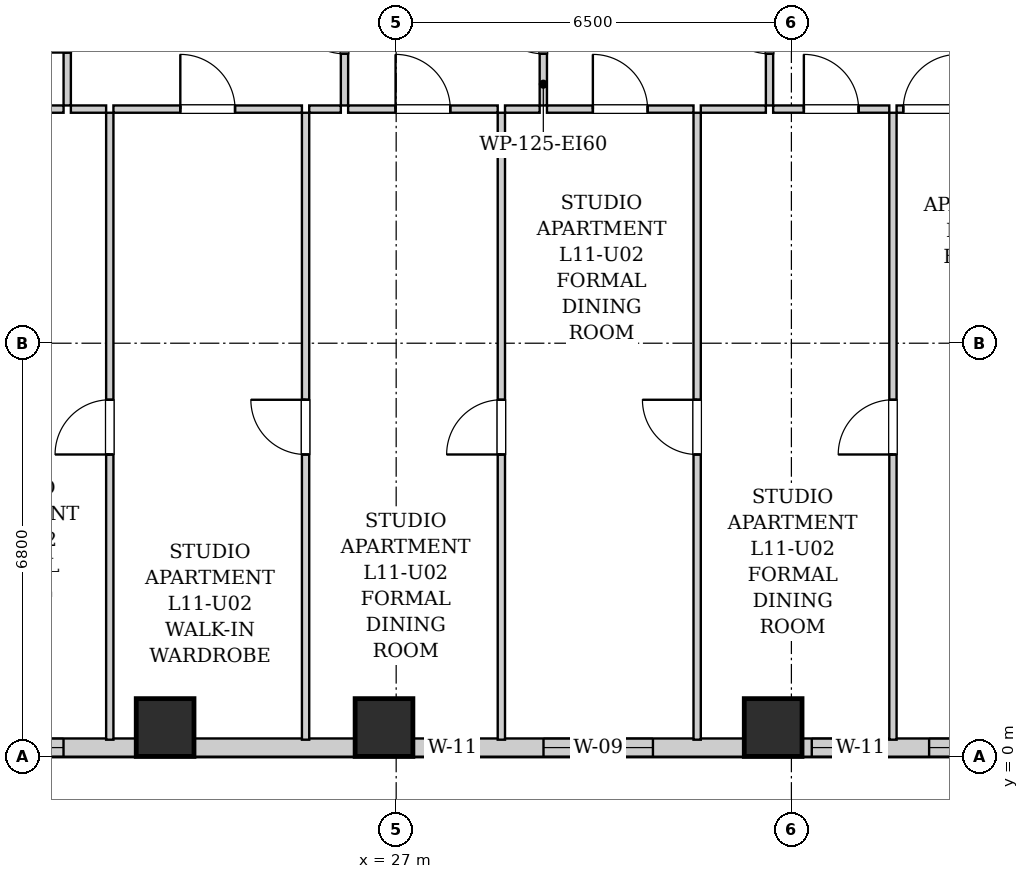
"""IFC4 building model, lengths in metres.
Left out: names, types, materials, properties, quantities, classifications, styles, units other than length and angle.
Written with IfcOpenShell. Run it as: python <this file> out.ifc"""

import sys

from ifc_helpers import new_model, si_unit, direction, frame, frame_2d, origin, origin_2d, place, context, subcontext, project, spatial, rectangle, extrude, element, fill, save


model = new_model("IFC4")
c1 = context("Model", 3, precision=1e-05, world=origin(), true_north=direction((0.0, 1.0)))
c2 = subcontext(c1, "Body", "Model", "MODEL_VIEW")
j1 = project(units=[si_unit("LENGTHUNIT", "METRE"), si_unit("PLANEANGLEUNIT", "RADIAN")], contexts=[c1])
p1 = place(None, origin())
s1 = spatial("IfcSite", under=j1, at=p1, CompositionType="ELEMENT")
p2 = place(p1, origin())
s2 = spatial("IfcBuilding", under=s1, at=p2, CompositionType="ELEMENT")
p3 = place(p2, frame((0.0, 0.0, 45.0)))
s3 = spatial("IfcBuildingStorey", under=s2, at=p3, CompositionType="ELEMENT", Elevation=45.0)
for number, where, z_axis, x_axis in (
    (1, (23.2, 0.48, 0.0), (0.0, 0.0, 1.0), (1.0, 0.0, 0.0)),
    (2, (26.8, 0.48, 0.0), (0.0, 0.0, 1.0), (1.0, 0.0, 0.0)),
    (3, (33.2, 0.48, 0.0), (0.0, 0.0, 1.0), (1.0, 0.0, 0.0)),
):
    element("IfcColumn", number, at=place(p3, frame(where, z_axis=z_axis, x_axis=x_axis)), inside=s3, PredefinedType="COLUMN", context=c2, shape_type="SweptSolid", body=[
        extrude(rectangle(XDim=0.95, YDim=0.95, at=origin_2d()), origin(), (0.0, 0.0, 1.0), 3.2),
    ])
p4 = place(p3, frame((44.0, 0.15, 0.0), z_axis=(0.0, 0.0, 1.0), x_axis=(-1.0, 0.0, 0.0)))
e4 = element("IfcWall", 4, at=p4, inside=s3, PredefinedType="SOLIDWALL", context=c2, shape_type="SweptSolid", body=[
    extrude(rectangle(XDim=25.7, YDim=0.3, at=frame_2d((12.85, 0.0))), origin(), (0.0, 0.0, 1.0), 1.975),
])
p5 = place(p4, frame((22.471, 0.0, 0.55)))
e5 = element("IfcOpeningElement", 5, at=p5, cuts=e4, PredefinedType="OPENING", context=c2, shape_type="SweptSolid", body=[
    extrude(rectangle(XDim=1.8, YDim=1.2, at=frame_2d((0.9, 0.6))), frame((0.0, 0.16, 0.0), z_axis=(0.0, -1.0, 0.0), x_axis=(1.0, 0.0, 0.0)), (0.0, 0.0, 1.0), 0.32),
])
p6 = place(p4, frame((15.65, 0.0, 0.55)))
e6 = element("IfcOpeningElement", 6, at=p6, cuts=e4, PredefinedType="OPENING", context=c2, shape_type="SweptSolid", body=[
    extrude(rectangle(XDim=0.85, YDim=1.2, at=frame_2d((0.425, 0.6))), frame((0.0, 0.16, 0.0), z_axis=(0.0, -1.0, 0.0), x_axis=(1.0, 0.0, 0.0)), (0.0, 0.0, 1.0), 0.32),
])
p7 = place(p4, frame((12.777, 0.0, 0.55)))
e7 = element("IfcOpeningElement", 7, at=p7, cuts=e4, PredefinedType="OPENING", context=c2, shape_type="SweptSolid", body=[
    extrude(rectangle(XDim=1.8, YDim=1.2, at=frame_2d((0.9, 0.6))), frame((0.0, 0.16, 0.0), z_axis=(0.0, -1.0, 0.0), x_axis=(1.0, 0.0, 0.0)), (0.0, 0.0, 1.0), 0.32),
])
p8 = place(p4, frame((9.315, 0.0, 0.55)))
e8 = element("IfcOpeningElement", 8, at=p8, cuts=e4, PredefinedType="OPENING", context=c2, shape_type="SweptSolid", body=[
    extrude(rectangle(XDim=0.85, YDim=1.2, at=frame_2d((0.425, 0.6))), frame((0.0, 0.16, 0.0), z_axis=(0.0, -1.0, 0.0), x_axis=(1.0, 0.0, 0.0)), (0.0, 0.0, 1.0), 0.32),
])
p9 = place(p4, frame((6.435, 0.0, 0.55)))
e9 = element("IfcOpeningElement", 9, at=p9, cuts=e4, PredefinedType="OPENING", context=c2, shape_type="SweptSolid", body=[
    extrude(rectangle(XDim=1.8, YDim=1.2, at=frame_2d((0.9, 0.6))), frame((0.0, 0.16, 0.0), z_axis=(0.0, -1.0, 0.0), x_axis=(1.0, 0.0, 0.0)), (0.0, 0.0, 1.0), 0.32),
])
p10 = place(p4, frame((2.106, 0.0, 0.55)))
e10 = element("IfcOpeningElement", 10, at=p10, cuts=e4, PredefinedType="OPENING", context=c2, shape_type="SweptSolid", body=[
    extrude(rectangle(XDim=1.8, YDim=1.2, at=frame_2d((0.9, 0.6))), frame((0.0, 0.16, 0.0), z_axis=(0.0, -1.0, 0.0), x_axis=(1.0, 0.0, 0.0)), (0.0, 0.0, 1.0), 0.32),
])
p11 = place(p3, frame((21.59, 10.71, 0.0), z_axis=(0.0, 0.0, 1.0), x_axis=(0.0, 1.0, 0.0)))
e11 = element("IfcWall", 11, at=p11, inside=s3, PredefinedType="PARTITIONING", context=c2, shape_type="SweptSolid", body=[
    extrude(rectangle(XDim=2.6, YDim=0.12, at=frame_2d((1.3, 0.0))), origin(), (0.0, 0.0, 1.0), 2.94),
])
p12 = place(p11, frame((0.87, 0.0, 0.0)))
e12 = element("IfcOpeningElement", 12, at=p12, cuts=e11, PredefinedType="OPENING", context=c2, shape_type="SweptSolid", body=[
    extrude(rectangle(XDim=0.86, YDim=2.05, at=frame_2d((0.43, 1.025))), frame((0.0, 0.07, 0.0), z_axis=(0.0, -1.0, 0.0), x_axis=(1.0, 0.0, 0.0)), (0.0, 0.0, 1.0), 0.14),
])
p13 = place(p3, frame((19.13, 10.65, 0.0), z_axis=(0.0, 0.0, 1.0), x_axis=(1.0, 0.0, 0.0)))
e13 = element("IfcWall", 13, at=p13, inside=s3, PredefinedType="PARTITIONING", context=c2, shape_type="SweptSolid", body=[
    extrude(rectangle(XDim=2.4, YDim=0.12, at=frame_2d((1.2, 0.0))), origin(), (0.0, 0.0, 1.0), 2.94),
])
p14 = place(p3, frame((26.15, 10.71, 0.0), z_axis=(0.0, 0.0, 1.0), x_axis=(0.0, 1.0, 0.0)))
e14 = element("IfcWall", 14, at=p14, inside=s3, PredefinedType="PARTITIONING", context=c2, shape_type="SweptSolid", body=[
    extrude(rectangle(XDim=2.6, YDim=0.12, at=frame_2d((1.3, 0.0))), origin(), (0.0, 0.0, 1.0), 2.94),
])
p15 = place(p14, frame((0.85, 0.0, 0.0)))
e15 = element("IfcOpeningElement", 15, at=p15, cuts=e14, PredefinedType="OPENING", context=c2, shape_type="SweptSolid", body=[
    extrude(rectangle(XDim=0.9, YDim=2.05, at=frame_2d((0.45, 1.025))), frame((0.0, 0.07, 0.0), z_axis=(0.0, -1.0, 0.0), x_axis=(1.0, 0.0, 0.0)), (0.0, 0.0, 1.0), 0.14),
])
p16 = place(p3, frame((21.65, 10.65, 0.0), z_axis=(0.0, 0.0, 1.0), x_axis=(1.0, 0.0, 0.0)))
e16 = element("IfcWall", 16, at=p16, inside=s3, PredefinedType="PARTITIONING", context=c2, shape_type="SweptSolid", body=[
    extrude(rectangle(XDim=0.58, YDim=0.12, at=frame_2d((0.29, 0.0))), origin(), (0.0, 0.0, 1.0), 2.94),
])
p17 = place(p3, frame((22.35, 10.65, 0.0), z_axis=(0.0, 0.0, 1.0), x_axis=(1.0, 0.0, 0.0)))
e17 = element("IfcWall", 17, at=p17, inside=s3, PredefinedType="PARTITIONING", context=c2, shape_type="SweptSolid", body=[
    extrude(rectangle(XDim=3.1, YDim=0.12, at=frame_2d((1.55, 0.0))), origin(), (0.0, 0.0, 1.0), 2.94),
])
p18 = place(p17, frame((1.1, 0.0, 0.0)))
e18 = element("IfcOpeningElement", 18, at=p18, cuts=e17, PredefinedType="OPENING", context=c2, shape_type="SweptSolid", body=[
    extrude(rectangle(XDim=0.9, YDim=2.05, at=frame_2d((0.45, 1.025))), frame((0.0, 0.07, 0.0), z_axis=(0.0, -1.0, 0.0), x_axis=(1.0, 0.0, 0.0)), (0.0, 0.0, 1.0), 0.14),
])
p19 = place(p3, frame((25.57, 10.65, 0.0), z_axis=(0.0, 0.0, 1.0), x_axis=(1.0, 0.0, 0.0)))
e19 = element("IfcWall", 19, at=p19, inside=s3, PredefinedType="PARTITIONING", context=c2, shape_type="SweptSolid", body=[
    extrude(rectangle(XDim=0.52, YDim=0.12, at=frame_2d((0.26, 0.0))), origin(), (0.0, 0.0, 1.0), 2.94),
])
p20 = place(p3, frame((29.42, 10.71, 0.0), z_axis=(0.0, 0.0, 1.0), x_axis=(0.0, 1.0, 0.0)))
e20 = element("IfcWall", 20, at=p20, inside=s3, PredefinedType="PARTITIONING", context=c2, shape_type="SweptSolid", body=[
    extrude(rectangle(XDim=2.6, YDim=0.12, at=frame_2d((1.3, 0.0))), origin(), (0.0, 0.0, 1.0), 2.94),
])
p21 = place(p20, frame((0.85, 0.0, 0.0)))
e21 = element("IfcOpeningElement", 21, at=p21, cuts=e20, PredefinedType="OPENING", context=c2, shape_type="SweptSolid", body=[
    extrude(rectangle(XDim=0.9, YDim=2.05, at=frame_2d((0.45, 1.025))), frame((0.0, 0.07, 0.0), z_axis=(0.0, -1.0, 0.0), x_axis=(1.0, 0.0, 0.0)), (0.0, 0.0, 1.0), 0.14),
])
p22 = place(p3, frame((26.21, 10.65, 0.0), z_axis=(0.0, 0.0, 1.0), x_axis=(1.0, 0.0, 0.0)))
e22 = element("IfcWall", 22, at=p22, inside=s3, PredefinedType="PARTITIONING", context=c2, shape_type="SweptSolid", body=[
    extrude(rectangle(XDim=2.46, YDim=0.12, at=frame_2d((1.23, 0.0))), origin(), (0.0, 0.0, 1.0), 2.94),
])
p23 = place(p22, frame((0.78, 0.0, 0.0)))
e23 = element("IfcOpeningElement", 23, at=p23, cuts=e22, PredefinedType="OPENING", context=c2, shape_type="SweptSolid", body=[
    extrude(rectangle(XDim=0.9, YDim=2.05, at=frame_2d((0.45, 1.025))), frame((0.0, 0.07, 0.0), z_axis=(0.0, -1.0, 0.0), x_axis=(1.0, 0.0, 0.0)), (0.0, 0.0, 1.0), 0.14),
])
p24 = place(p3, frame((28.79, 10.65, 0.0), z_axis=(0.0, 0.0, 1.0), x_axis=(1.0, 0.0, 0.0)))
e24 = element("IfcWall", 24, at=p24, inside=s3, PredefinedType="PARTITIONING", context=c2, shape_type="SweptSolid", body=[
    extrude(rectangle(XDim=0.57, YDim=0.12, at=frame_2d((0.285, 0.0))), origin(), (0.0, 0.0, 1.0), 2.94),
])
p25 = place(p3, frame((33.14, 10.71, 0.0), z_axis=(0.0, 0.0, 1.0), x_axis=(0.0, 1.0, 0.0)))
e25 = element("IfcWall", 25, at=p25, inside=s3, PredefinedType="PARTITIONING", context=c2, shape_type="SweptSolid", body=[
    extrude(rectangle(XDim=2.6, YDim=0.12, at=frame_2d((1.3, 0.0))), origin(), (0.0, 0.0, 1.0), 2.155),
])
p26 = place(p25, frame((0.85, 0.0, 0.0)))
e26 = element("IfcOpeningElement", 26, at=p26, cuts=e25, PredefinedType="OPENING", context=c2, shape_type="SweptSolid", body=[
    extrude(rectangle(XDim=0.9, YDim=2.05, at=frame_2d((0.45, 1.025))), frame((0.0, 0.07, 0.0), z_axis=(0.0, -1.0, 0.0), x_axis=(1.0, 0.0, 0.0)), (0.0, 0.0, 1.0), 0.14),
])
p27 = place(p3, frame((29.48, 10.65, 0.0), z_axis=(0.0, 0.0, 1.0), x_axis=(1.0, 0.0, 0.0)))
e27 = element("IfcWall", 27, at=p27, inside=s3, PredefinedType="PARTITIONING", context=c2, shape_type="SweptSolid", body=[
    extrude(rectangle(XDim=2.41, YDim=0.12, at=frame_2d((1.205, 0.0))), origin(), (0.0, 0.0, 1.0), 2.94),
])
p28 = place(p27, frame((0.755, 0.0, 0.0)))
e28 = element("IfcOpeningElement", 28, at=p28, cuts=e27, PredefinedType="OPENING", context=c2, shape_type="SweptSolid", body=[
    extrude(rectangle(XDim=0.9, YDim=2.05, at=frame_2d((0.45, 1.025))), frame((0.0, 0.07, 0.0), z_axis=(0.0, -1.0, 0.0), x_axis=(1.0, 0.0, 0.0)), (0.0, 0.0, 1.0), 0.14),
])
p29 = place(p3, frame((32.01, 10.65, 0.0), z_axis=(0.0, 0.0, 1.0), x_axis=(1.0, 0.0, 0.0)))
e29 = element("IfcWall", 29, at=p29, inside=s3, PredefinedType="PARTITIONING", context=c2, shape_type="SweptSolid", body=[
    extrude(rectangle(XDim=1.07, YDim=0.12, at=frame_2d((0.535, 0.0))), origin(), (0.0, 0.0, 1.0), 2.94),
])
p30 = place(p3, frame((33.2, 10.65, 0.0), z_axis=(0.0, 0.0, 1.0), x_axis=(1.0, 0.0, 0.0)))
e30 = element("IfcWall", 30, at=p30, inside=s3, PredefinedType="PARTITIONING", context=c2, shape_type="SweptSolid", body=[
    extrude(rectangle(XDim=1.91, YDim=0.12, at=frame_2d((0.955, 0.0))), origin(), (0.0, 0.0, 1.0), 2.94),
])
p31 = place(p30, frame((0.505, 0.0, 0.0)))
e31 = element("IfcOpeningElement", 31, at=p31, cuts=e30, PredefinedType="OPENING", context=c2, shape_type="SweptSolid", body=[
    extrude(rectangle(XDim=0.9, YDim=2.05, at=frame_2d((0.45, 1.025))), frame((0.0, 0.07, 0.0), z_axis=(0.0, -1.0, 0.0), x_axis=(1.0, 0.0, 0.0)), (0.0, 0.0, 1.0), 0.14),
])
p32 = place(p3, frame((35.23, 10.65, 0.0), z_axis=(0.0, 0.0, 1.0), x_axis=(1.0, 0.0, 0.0)))
e32 = element("IfcWall", 32, at=p32, inside=s3, PredefinedType="PARTITIONING", context=c2, shape_type="SweptSolid", body=[
    extrude(rectangle(XDim=1.12, YDim=0.12, at=frame_2d((0.56, 0.0))), origin(), (0.0, 0.0, 1.0), 2.94),
])
p33 = place(p32, frame((0.11, 0.0, 0.0)))
e33 = element("IfcOpeningElement", 33, at=p33, cuts=e32, PredefinedType="OPENING", context=c2, shape_type="SweptSolid", body=[
    extrude(rectangle(XDim=0.9, YDim=2.05, at=frame_2d((0.45, 1.025))), frame((0.0, 0.07, 0.0), z_axis=(0.0, -1.0, 0.0), x_axis=(1.0, 0.0, 0.0)), (0.0, 0.0, 1.0), 0.14),
])
p34 = place(p3, frame((22.29, 0.28, 0.0), z_axis=(0.0, 0.0, 1.0), x_axis=(0.0, 1.0, 0.0)))
e34 = element("IfcWall", 34, at=p34, inside=s3, PredefinedType="PARTITIONING", context=c2, shape_type="SweptSolid", body=[
    extrude(rectangle(XDim=10.31, YDim=0.12, at=frame_2d((5.155, 0.0))), origin(), (0.0, 0.0, 1.0), 2.94),
])
p35 = place(p34, frame((4.69, 0.0, 0.0)))
e35 = element("IfcOpeningElement", 35, at=p35, cuts=e34, PredefinedType="OPENING", context=c2, shape_type="SweptSolid", body=[
    extrude(rectangle(XDim=0.9, YDim=2.05, at=frame_2d((0.45, 1.025))), frame((0.0, 0.07, 0.0), z_axis=(0.0, -1.0, 0.0), x_axis=(1.0, 0.0, 0.0)), (0.0, 0.0, 1.0), 0.14),
])
p36 = place(p3, frame((25.51, 0.28, 0.0), z_axis=(0.0, 0.0, 1.0), x_axis=(0.0, 1.0, 0.0)))
e36 = element("IfcWall", 36, at=p36, inside=s3, PredefinedType="PARTITIONING", context=c2, shape_type="SweptSolid", body=[
    extrude(rectangle(XDim=10.31, YDim=0.12, at=frame_2d((5.155, 0.0))), origin(), (0.0, 0.0, 1.0), 2.94),
])
p37 = place(p36, frame((4.69, 0.0, 0.0)))
e37 = element("IfcOpeningElement", 37, at=p37, cuts=e36, PredefinedType="OPENING", context=c2, shape_type="SweptSolid", body=[
    extrude(rectangle(XDim=0.9, YDim=2.05, at=frame_2d((0.45, 1.025))), frame((0.0, 0.07, 0.0), z_axis=(0.0, -1.0, 0.0), x_axis=(1.0, 0.0, 0.0)), (0.0, 0.0, 1.0), 0.14),
])
p38 = place(p3, frame((28.73, 0.28, 0.0), z_axis=(0.0, 0.0, 1.0), x_axis=(0.0, 1.0, 0.0)))
e38 = element("IfcWall", 38, at=p38, inside=s3, PredefinedType="PARTITIONING", context=c2, shape_type="SweptSolid", body=[
    extrude(rectangle(XDim=10.31, YDim=0.12, at=frame_2d((5.155, 0.0))), origin(), (0.0, 0.0, 1.0), 2.94),
])
p39 = place(p38, frame((4.69, 0.0, 0.0)))
e39 = element("IfcOpeningElement", 39, at=p39, cuts=e38, PredefinedType="OPENING", context=c2, shape_type="SweptSolid", body=[
    extrude(rectangle(XDim=0.9, YDim=2.05, at=frame_2d((0.45, 1.025))), frame((0.0, 0.07, 0.0), z_axis=(0.0, -1.0, 0.0), x_axis=(1.0, 0.0, 0.0)), (0.0, 0.0, 1.0), 0.14),
])
p40 = place(p3, frame((31.95, 0.28, 0.0), z_axis=(0.0, 0.0, 1.0), x_axis=(0.0, 1.0, 0.0)))
e40 = element("IfcWall", 40, at=p40, inside=s3, PredefinedType="PARTITIONING", context=c2, shape_type="SweptSolid", body=[
    extrude(rectangle(XDim=10.31, YDim=0.12, at=frame_2d((5.155, 0.0))), origin(), (0.0, 0.0, 1.0), 2.94),
])
p41 = place(p40, frame((4.69, 0.0, 0.0)))
e41 = element("IfcOpeningElement", 41, at=p41, cuts=e40, PredefinedType="OPENING", context=c2, shape_type="SweptSolid", body=[
    extrude(rectangle(XDim=0.9, YDim=2.05, at=frame_2d((0.45, 1.025))), frame((0.0, 0.07, 0.0), z_axis=(0.0, -1.0, 0.0), x_axis=(1.0, 0.0, 0.0)), (0.0, 0.0, 1.0), 0.14),
])
p42 = place(p3, frame((35.17, 0.28, 0.0), z_axis=(0.0, 0.0, 1.0), x_axis=(0.0, 1.0, 0.0)))
e42 = element("IfcWall", 42, at=p42, inside=s3, PredefinedType="PARTITIONING", context=c2, shape_type="SweptSolid", body=[
    extrude(rectangle(XDim=10.31, YDim=0.12, at=frame_2d((5.155, 0.0))), origin(), (0.0, 0.0, 1.0), 2.94),
])
p43 = place(p42, frame((4.69, 0.0, 0.0)))
e43 = element("IfcOpeningElement", 43, at=p43, cuts=e42, PredefinedType="OPENING", context=c2, shape_type="SweptSolid", body=[
    extrude(rectangle(XDim=0.9, YDim=2.05, at=frame_2d((0.45, 1.025))), frame((0.0, 0.07, 0.0), z_axis=(0.0, -1.0, 0.0), x_axis=(1.0, 0.0, 0.0)), (0.0, 0.0, 1.0), 0.14),
])
p44 = place(p12, origin())
e44 = element("IfcDoor", 44, at=p44, inside=s3, OperationType="SINGLE_SWING_LEFT", PredefinedType="DOOR", context=c2, shape_type="SweptSolid", body=[
    extrude(rectangle(XDim=0.86, YDim=2.05, at=frame_2d((0.43, 1.025))), frame((0.0, 0.025, 0.0), z_axis=(0.0, -1.0, 0.0), x_axis=(1.0, 0.0, 0.0)), (0.0, 0.0, 1.0), 0.05),
])
fill(e12, e44)
p45 = place(p15, origin())
e45 = element("IfcDoor", 45, at=p45, inside=s3, OperationType="SINGLE_SWING_RIGHT", PredefinedType="DOOR", context=c2, shape_type="SweptSolid", body=[
    extrude(rectangle(XDim=0.9, YDim=2.05, at=frame_2d((0.45, 1.025))), frame((0.0, 0.025, 0.0), z_axis=(0.0, -1.0, 0.0), x_axis=(1.0, 0.0, 0.0)), (0.0, 0.0, 1.0), 0.05),
])
fill(e15, e45)
p46 = place(p18, origin())
e46 = element("IfcDoor", 46, at=p46, inside=s3, OperationType="SINGLE_SWING_LEFT", PredefinedType="DOOR", context=c2, shape_type="SweptSolid", body=[
    extrude(rectangle(XDim=0.9, YDim=2.05, at=frame_2d((0.45, 1.025))), frame((0.0, 0.025, 0.0), z_axis=(0.0, -1.0, 0.0), x_axis=(1.0, 0.0, 0.0)), (0.0, 0.0, 1.0), 0.05),
])
fill(e18, e46)
p47 = place(p21, origin())
e47 = element("IfcDoor", 47, at=p47, inside=s3, OperationType="SINGLE_SWING_RIGHT", PredefinedType="DOOR", context=c2, shape_type="SweptSolid", body=[
    extrude(rectangle(XDim=0.9, YDim=2.05, at=frame_2d((0.45, 1.025))), frame((0.0, 0.025, 0.0), z_axis=(0.0, -1.0, 0.0), x_axis=(1.0, 0.0, 0.0)), (0.0, 0.0, 1.0), 0.05),
])
fill(e21, e47)
p48 = place(p23, origin())
e48 = element("IfcDoor", 48, at=p48, inside=s3, OperationType="SINGLE_SWING_LEFT", PredefinedType="DOOR", context=c2, shape_type="SweptSolid", body=[
    extrude(rectangle(XDim=0.9, YDim=2.05, at=frame_2d((0.45, 1.025))), frame((0.0, 0.025, 0.0), z_axis=(0.0, -1.0, 0.0), x_axis=(1.0, 0.0, 0.0)), (0.0, 0.0, 1.0), 0.05),
])
fill(e23, e48)
p49 = place(p26, origin())
e49 = element("IfcDoor", 49, at=p49, inside=s3, OperationType="SINGLE_SWING_RIGHT", PredefinedType="DOOR", context=c2, shape_type="SweptSolid", body=[
    extrude(rectangle(XDim=0.9, YDim=2.05, at=frame_2d((0.45, 1.025))), frame((0.0, 0.025, 0.0), z_axis=(0.0, -1.0, 0.0), x_axis=(1.0, 0.0, 0.0)), (0.0, 0.0, 1.0), 0.05),
])
fill(e26, e49)
p50 = place(p28, origin())
e50 = element("IfcDoor", 50, at=p50, inside=s3, OperationType="SINGLE_SWING_LEFT", PredefinedType="DOOR", context=c2, shape_type="SweptSolid", body=[
    extrude(rectangle(XDim=0.9, YDim=2.05, at=frame_2d((0.45, 1.025))), frame((0.0, 0.025, 0.0), z_axis=(0.0, -1.0, 0.0), x_axis=(1.0, 0.0, 0.0)), (0.0, 0.0, 1.0), 0.05),
])
fill(e28, e50)
p51 = place(p31, origin())
e51 = element("IfcDoor", 51, at=p51, inside=s3, OperationType="SINGLE_SWING_LEFT", PredefinedType="DOOR", context=c2, shape_type="SweptSolid", body=[
    extrude(rectangle(XDim=0.9, YDim=2.05, at=frame_2d((0.45, 1.025))), frame((0.0, 0.025, 0.0), z_axis=(0.0, -1.0, 0.0), x_axis=(1.0, 0.0, 0.0)), (0.0, 0.0, 1.0), 0.05),
])
fill(e31, e51)
p52 = place(p33, origin())
e52 = element("IfcDoor", 52, at=p52, inside=s3, OperationType="SINGLE_SWING_RIGHT", PredefinedType="DOOR", context=c2, shape_type="SweptSolid", body=[
    extrude(rectangle(XDim=0.9, YDim=2.05, at=frame_2d((0.45, 1.025))), frame((0.0, 0.025, 0.0), z_axis=(0.0, -1.0, 0.0), x_axis=(1.0, 0.0, 0.0)), (0.0, 0.0, 1.0), 0.05),
])
fill(e33, e52)
p53 = place(p35, origin())
e53 = element("IfcDoor", 53, at=p53, inside=s3, OperationType="SINGLE_SWING_LEFT", PredefinedType="DOOR", context=c2, shape_type="SweptSolid", body=[
    extrude(rectangle(XDim=0.9, YDim=2.05, at=frame_2d((0.45, 1.025))), frame((0.0, 0.025, 0.0), z_axis=(0.0, -1.0, 0.0), x_axis=(1.0, 0.0, 0.0)), (0.0, 0.0, 1.0), 0.05),
])
fill(e35, e53)
p54 = place(p37, origin())
e54 = element("IfcDoor", 54, at=p54, inside=s3, OperationType="SINGLE_SWING_RIGHT", PredefinedType="DOOR", context=c2, shape_type="SweptSolid", body=[
    extrude(rectangle(XDim=0.9, YDim=2.05, at=frame_2d((0.45, 1.025))), frame((0.0, 0.025, 0.0), z_axis=(0.0, -1.0, 0.0), x_axis=(1.0, 0.0, 0.0)), (0.0, 0.0, 1.0), 0.05),
])
fill(e37, e54)
p55 = place(p39, origin())
e55 = element("IfcDoor", 55, at=p55, inside=s3, OperationType="SINGLE_SWING_LEFT", PredefinedType="DOOR", context=c2, shape_type="SweptSolid", body=[
    extrude(rectangle(XDim=0.9, YDim=2.05, at=frame_2d((0.45, 1.025))), frame((0.0, 0.025, 0.0), z_axis=(0.0, -1.0, 0.0), x_axis=(1.0, 0.0, 0.0)), (0.0, 0.0, 1.0), 0.05),
])
fill(e39, e55)
p56 = place(p41, origin())
e56 = element("IfcDoor", 56, at=p56, inside=s3, OperationType="SINGLE_SWING_RIGHT", PredefinedType="DOOR", context=c2, shape_type="SweptSolid", body=[
    extrude(rectangle(XDim=0.9, YDim=2.05, at=frame_2d((0.45, 1.025))), frame((0.0, 0.025, 0.0), z_axis=(0.0, -1.0, 0.0), x_axis=(1.0, 0.0, 0.0)), (0.0, 0.0, 1.0), 0.05),
])
fill(e41, e56)
p57 = place(p43, origin())
e57 = element("IfcDoor", 57, at=p57, inside=s3, OperationType="SINGLE_SWING_LEFT", PredefinedType="DOOR", context=c2, shape_type="SweptSolid", body=[
    extrude(rectangle(XDim=0.9, YDim=2.05, at=frame_2d((0.45, 1.025))), frame((0.0, 0.025, 0.0), z_axis=(0.0, -1.0, 0.0), x_axis=(1.0, 0.0, 0.0)), (0.0, 0.0, 1.0), 0.05),
])
fill(e43, e57)
p58 = place(p5, origin())
e58 = element("IfcWindow", 58, at=p58, inside=s3, PartitioningType="DOUBLE_PANEL_VERTICAL", PredefinedType="WINDOW", context=c2, shape_type="SweptSolid", body=[
    extrude(rectangle(XDim=1.8, YDim=1.2, at=frame_2d((0.9, 0.6))), frame((0.0, 0.03, 0.0), z_axis=(0.0, -1.0, 0.0), x_axis=(1.0, 0.0, 0.0)), (0.0, 0.0, 1.0), 0.06),
])
fill(e5, e58)
p59 = place(p6, origin())
e59 = element("IfcWindow", 59, at=p59, inside=s3, PartitioningType="SINGLE_PANEL", PredefinedType="WINDOW", context=c2, shape_type="SweptSolid", body=[
    extrude(rectangle(XDim=0.85, YDim=1.2, at=frame_2d((0.425, 0.6))), frame((0.0, 0.03, 0.0), z_axis=(0.0, -1.0, 0.0), x_axis=(1.0, 0.0, 0.0)), (0.0, 0.0, 1.0), 0.06),
])
fill(e6, e59)
p60 = place(p7, origin())
e60 = element("IfcWindow", 60, at=p60, inside=s3, PartitioningType="DOUBLE_PANEL_VERTICAL", PredefinedType="WINDOW", context=c2, shape_type="SweptSolid", body=[
    extrude(rectangle(XDim=1.8, YDim=1.2, at=frame_2d((0.9, 0.6))), frame((0.0, 0.03, 0.0), z_axis=(0.0, -1.0, 0.0), x_axis=(1.0, 0.0, 0.0)), (0.0, 0.0, 1.0), 0.06),
])
fill(e7, e60)
p61 = place(p8, origin())
e61 = element("IfcWindow", 61, at=p61, inside=s3, PartitioningType="SINGLE_PANEL", PredefinedType="WINDOW", context=c2, shape_type="SweptSolid", body=[
    extrude(rectangle(XDim=0.85, YDim=1.2, at=frame_2d((0.425, 0.6))), frame((0.0, 0.03, 0.0), z_axis=(0.0, -1.0, 0.0), x_axis=(1.0, 0.0, 0.0)), (0.0, 0.0, 1.0), 0.06),
])
fill(e8, e61)
p62 = place(p9, origin())
e62 = element("IfcWindow", 62, at=p62, inside=s3, PartitioningType="DOUBLE_PANEL_VERTICAL", PredefinedType="WINDOW", context=c2, shape_type="SweptSolid", body=[
    extrude(rectangle(XDim=1.8, YDim=1.2, at=frame_2d((0.9, 0.6))), frame((0.0, 0.03, 0.0), z_axis=(0.0, -1.0, 0.0), x_axis=(1.0, 0.0, 0.0)), (0.0, 0.0, 1.0), 0.06),
])
fill(e9, e62)
save(model, sys.argv[1])
